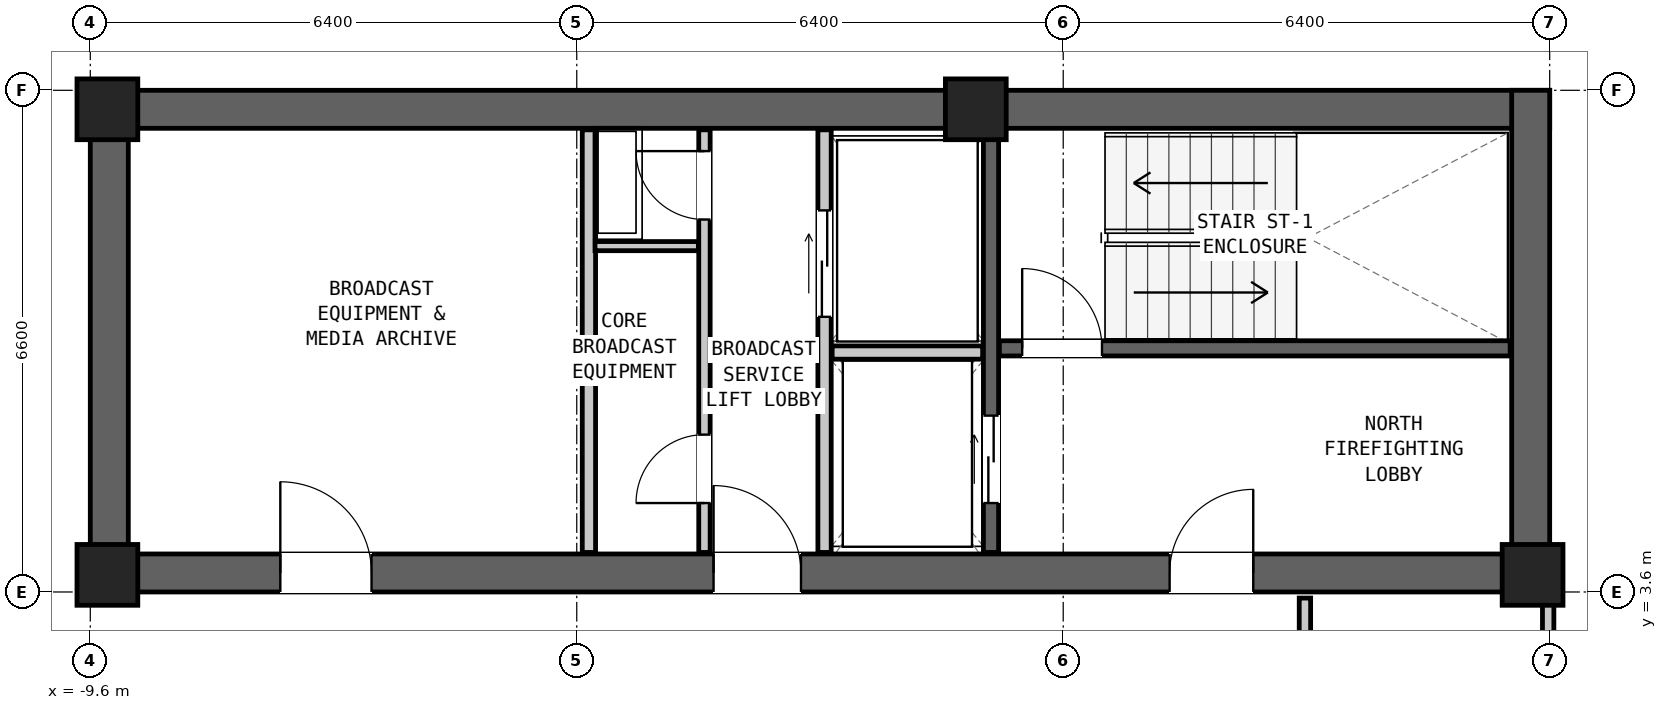
"""IFC4 building model, lengths in metres.
Left out: names, types, materials, properties, quantities, classifications, styles, units other than length and angle.
Written with IfcOpenShell. Run it as: python <this file> out.ifc"""

import sys

from ifc_helpers import new_model, si_unit, direction, frame, frame_2d, origin, origin_2d, place, context, subcontext, project, spatial, rectangle, extrude, element, fill, save


model = new_model("IFC4")
c1 = context("Model", 3, precision=1e-05, world=origin(), true_north=direction((0.0, 1.0)))
c2 = subcontext(c1, "Body", "Model", "MODEL_VIEW")
j1 = project(units=[si_unit("LENGTHUNIT", "METRE"), si_unit("PLANEANGLEUNIT", "RADIAN")], contexts=[c1])
p1 = place(None, origin())
s1 = spatial("IfcSite", under=j1, at=p1, CompositionType="ELEMENT")
p2 = place(p1, origin())
s2 = spatial("IfcBuilding", under=s1, at=p2, CompositionType="ELEMENT")
p3 = place(p2, frame((0.0, 0.0, 148.2)))
s3 = spatial("IfcBuildingStorey", under=s2, at=p3, CompositionType="ELEMENT", Elevation=148.2)
p4 = place(p3, frame((-9.6, 9.95, 0.0), z_axis=(0.0, 0.0, 1.0), x_axis=(1.0, 0.0, 0.0)))
e1 = element("IfcWall", 1, at=p4, inside=s3, PredefinedType="SHEAR", context=c2, shape_type="SweptSolid", body=[
    extrude(rectangle(XDim=19.2, YDim=0.5, at=frame_2d((9.6, 0.0))), origin(), (0.0, 0.0, 1.0), 3.6),
])
p5 = place(p3, frame((-9.6, 3.85, 0.0), z_axis=(0.0, 0.0, 1.0), x_axis=(1.0, 0.0, 0.0)))
e2 = element("IfcWall", 2, at=p5, inside=s3, PredefinedType="SHEAR", context=c2, shape_type="SweptSolid", body=[
    extrude(rectangle(XDim=19.2, YDim=0.5, at=frame_2d((9.6, 0.0))), origin(), (0.0, 0.0, 1.0), 3.6),
])
p6 = place(p5, frame((14.2, 0.0, 0.0)))
e3 = element("IfcOpeningElement", 3, at=p6, cuts=e2, PredefinedType="OPENING", context=c2, shape_type="SweptSolid", body=[
    extrude(rectangle(XDim=1.1, YDim=2.08, at=frame_2d((0.55, 1.04))), frame((0.0, 0.262, 0.0), z_axis=(0.0, -1.0, 0.0), x_axis=(1.0, 0.0, 0.0)), (0.0, 0.0, 1.0), 0.524),
])
p7 = place(p5, frame((8.2, 0.0, 0.0)))
e4 = element("IfcOpeningElement", 4, at=p7, cuts=e2, PredefinedType="OPENING", context=c2, shape_type="SweptSolid", body=[
    extrude(rectangle(XDim=1.15, YDim=2.1, at=frame_2d((0.575, 1.05))), frame((0.0, 0.262, 0.0), z_axis=(0.0, -1.0, 0.0), x_axis=(1.0, 0.0, 0.0)), (0.0, 0.0, 1.0), 0.524),
])
p8 = place(p5, frame((2.5, 0.0, 0.0)))
e5 = element("IfcOpeningElement", 5, at=p8, cuts=e2, PredefinedType="OPENING", context=c2, shape_type="SweptSolid", body=[
    extrude(rectangle(XDim=1.2, YDim=2.1, at=frame_2d((0.6, 1.05))), frame((0.0, 0.262, 0.0), z_axis=(0.0, -1.0, 0.0), x_axis=(1.0, 0.0, 0.0)), (0.0, 0.0, 1.0), 0.524),
])
for number, where, z_axis, x_axis in (
    (6, (-9.35, 3.6, 0.0), (0.0, 0.0, 1.0), (0.0, 1.0, 0.0)),
    (7, (9.35, 3.6, 0.0), (0.0, 0.0, 1.0), (0.0, 1.0, 0.0)),
):
    element("IfcWall", number, at=place(p3, frame(where, z_axis=z_axis, x_axis=x_axis)), inside=s3, PredefinedType="SHEAR", context=c2, shape_type="SweptSolid", body=[
        extrude(rectangle(XDim=6.6, YDim=0.5, at=frame_2d((3.3, 0.0))), origin(), (0.0, 0.0, 1.0), 3.6),
    ])
for number, where, z_axis, x_axis in (
    (8, (-9.375, 9.95, 0.0), (0.0, 0.0, 1.0), (1.0, 0.0, 0.0)),
    (9, (2.05, 9.95, 0.0), (0.0, 0.0, 1.0), (1.0, 0.0, 0.0)),
    (10, (-9.375, 3.825, 0.0), (0.0, 0.0, 1.0), (1.0, 0.0, 0.0)),
    (11, (9.375, 3.825, 0.0), (0.0, 0.0, 1.0), (1.0, 0.0, 0.0)),
):
    element("IfcColumn", number, at=place(p3, frame(where, z_axis=z_axis, x_axis=x_axis)), inside=s3, PredefinedType="COLUMN", context=c2, shape_type="SweptSolid", body=[
        extrude(rectangle(XDim=0.8, YDim=0.8, at=origin_2d()), origin(), (0.0, 0.0, 1.0), 3.6),
    ])
p9 = place(p3, frame((2.36, 6.805, 0.0), z_axis=(0.0, 0.0, 1.0), x_axis=(1.0, 0.0, 0.0)))
e12 = element("IfcWall", 12, at=p9, inside=s3, PredefinedType="SHEAR", context=c2, shape_type="SweptSolid", body=[
    extrude(rectangle(XDim=6.72, YDim=0.2, at=frame_2d((3.36, 0.0))), origin(), (0.0, 0.0, 1.0), 3.22),
])
p10 = place(p9, frame((0.3, 0.0, 0.0)))
e13 = element("IfcOpeningElement", 13, at=p10, cuts=e12, PredefinedType="OPENING", context=c2, shape_type="SweptSolid", body=[
    extrude(rectangle(XDim=1.05, YDim=2.08, at=frame_2d((0.525, 1.04))), frame((0.0, 0.112, 0.0), z_axis=(0.0, -1.0, 0.0), x_axis=(1.0, 0.0, 0.0)), (0.0, 0.0, 1.0), 0.224),
])
p11 = place(p3, frame((2.25, 4.12, 0.0), z_axis=(0.0, 0.0, 1.0), x_axis=(0.0, 1.0, 0.0)))
e14 = element("IfcWall", 14, at=p11, inside=s3, PredefinedType="SHEAR", context=c2, shape_type="SweptSolid", body=[
    extrude(rectangle(XDim=5.56, YDim=0.2, at=frame_2d((2.78, 0.0))), origin(), (0.0, 0.0, 1.0), 3.22),
])
p12 = place(p11, frame((0.65, 0.0, 0.0)))
e15 = element("IfcOpeningElement", 15, at=p12, cuts=e14, PredefinedType="OPENING", context=c2, shape_type="SweptSolid", body=[
    extrude(rectangle(XDim=1.15, YDim=2.08, at=frame_2d((0.575, 1.04))), frame((0.0, 0.112, 0.0), z_axis=(0.0, -1.0, 0.0), x_axis=(1.0, 0.0, 0.0)), (0.0, 0.0, 1.0), 0.224),
])
p13 = place(p3, frame((0.06, 4.12, 0.0), z_axis=(0.0, 0.0, 1.0), x_axis=(0.0, 1.0, 0.0)))
e16 = element("IfcWall", 16, at=p13, inside=s3, PredefinedType="PARTITIONING", context=c2, shape_type="SweptSolid", body=[
    extrude(rectangle(XDim=5.56, YDim=0.175, at=frame_2d((2.78, 0.0))), origin(), (0.0, 0.0, 1.0), 3.22),
])
p14 = place(p13, frame((3.1, 0.0, 0.0)))
e17 = element("IfcOpeningElement", 17, at=p14, cuts=e16, PredefinedType="OPENING", context=c2, shape_type="SweptSolid", body=[
    extrude(rectangle(XDim=1.4, YDim=2.12, at=frame_2d((0.7, 1.06))), frame((0.0, 0.1, 0.0), z_axis=(0.0, -1.0, 0.0), x_axis=(1.0, 0.0, 0.0)), (0.0, 0.0, 1.0), 0.199),
])
p15 = place(p3, frame((0.16, 6.75, 0.0), z_axis=(0.0, 0.0, 1.0), x_axis=(1.0, 0.0, 0.0)))
e18 = element("IfcWall", 18, at=p15, inside=s3, PredefinedType="PARTITIONING", context=c2, shape_type="SweptSolid", body=[
    extrude(rectangle(XDim=1.98, YDim=0.175, at=frame_2d((0.99, 0.0))), origin(), (0.0, 0.0, 1.0), 3.22),
])
p16 = place(p3, frame((-3.04, 4.12, 0.0), z_axis=(0.0, 0.0, 1.0), x_axis=(0.0, 1.0, 0.0)))
e19 = element("IfcWall", 19, at=p16, inside=s3, PredefinedType="PARTITIONING", context=c2, shape_type="SweptSolid", body=[
    extrude(rectangle(XDim=5.56, YDim=0.175, at=frame_2d((2.78, 0.0))), origin(), (0.0, 0.0, 1.0), 3.22),
])
p17 = place(p3, frame((-1.52, 4.12, 0.0), z_axis=(0.0, 0.0, 1.0), x_axis=(0.0, 1.0, 0.0)))
e20 = element("IfcWall", 20, at=p17, inside=s3, PredefinedType="PARTITIONING", context=c2, shape_type="SweptSolid", body=[
    extrude(rectangle(XDim=5.56, YDim=0.15, at=frame_2d((2.78, 0.0))), origin(), (0.0, 0.0, 1.0), 3.22),
])
p18 = place(p17, frame((4.38, 0.0, 0.0)))
e21 = element("IfcOpeningElement", 21, at=p18, cuts=e20, PredefinedType="OPENING", context=c2, shape_type="SweptSolid", body=[
    extrude(rectangle(XDim=0.9, YDim=2.05, at=frame_2d((0.45, 1.025))), frame((0.0, 0.087, 0.0), z_axis=(0.0, -1.0, 0.0), x_axis=(1.0, 0.0, 0.0)), (0.0, 0.0, 1.0), 0.174),
])
p19 = place(p17, frame((0.65, 0.0, 0.0)))
e22 = element("IfcOpeningElement", 22, at=p19, cuts=e20, PredefinedType="OPENING", context=c2, shape_type="SweptSolid", body=[
    extrude(rectangle(XDim=0.9, YDim=2.05, at=frame_2d((0.45, 1.025))), frame((0.0, 0.087, 0.0), z_axis=(0.0, -1.0, 0.0), x_axis=(1.0, 0.0, 0.0)), (0.0, 0.0, 1.0), 0.174),
])
p20 = place(p3, frame((-2.96, 8.15, 0.0), z_axis=(0.0, 0.0, 1.0), x_axis=(1.0, 0.0, 0.0)))
e23 = element("IfcWall", 23, at=p20, inside=s3, PredefinedType="PARTITIONING", context=c2, shape_type="SweptSolid", body=[
    extrude(rectangle(XDim=1.36, YDim=0.12, at=frame_2d((0.68, 0.0))), origin(), (0.0, 0.0, 1.0), 3.22),
])
p21 = place(p3, frame((6.38, -2.32, 0.0), z_axis=(0.0, 0.0, 1.0), x_axis=(0.0, 1.0, 0.0)))
e24 = element("IfcWall", 24, at=p21, inside=s3, PredefinedType="PARTITIONING", context=c2, shape_type="SweptSolid", body=[
    extrude(rectangle(XDim=5.84, YDim=0.15, at=frame_2d((2.92, 0.0))), origin(), (0.0, 0.0, 1.0), 2.588),
])
p22 = place(p3, frame((9.58, -2.32, 0.0), z_axis=(0.0, 0.0, 1.0), x_axis=(0.0, 1.0, 0.0)))
e25 = element("IfcWall", 25, at=p22, inside=s3, PredefinedType="PARTITIONING", context=c2, shape_type="SweptSolid", body=[
    extrude(rectangle(XDim=5.84, YDim=0.15, at=frame_2d((2.92, 0.0))), origin(), (0.0, 0.0, 1.0), 2.588),
])
p23 = place(p22, frame((2.445, 0.0, 0.0)))
e26 = element("IfcOpeningElement", 26, at=p23, cuts=e25, PredefinedType="OPENING", context=c2, shape_type="SweptSolid", body=[
    extrude(rectangle(XDim=0.95, YDim=2.1, at=frame_2d((0.475, 1.05))), frame((0.0, 0.087, 0.0), z_axis=(0.0, -1.0, 0.0), x_axis=(1.0, 0.0, 0.0)), (0.0, 0.0, 1.0), 0.174),
])
p24 = place(p10, origin())
e27 = element("IfcDoor", 27, at=p24, inside=s3, OperationType="SINGLE_SWING_LEFT", PredefinedType="DOOR", context=c2, shape_type="SweptSolid", body=[
    extrude(rectangle(XDim=1.05, YDim=2.08, at=frame_2d((0.525, 1.04))), frame((0.0, 0.025, 0.0), z_axis=(0.0, -1.0, 0.0), x_axis=(1.0, 0.0, 0.0)), (0.0, 0.0, 1.0), 0.05),
])
fill(e13, e27)
p25 = place(p6, origin())
e28 = element("IfcDoor", 28, at=p25, inside=s3, OperationType="SINGLE_SWING_RIGHT", PredefinedType="DOOR", context=c2, shape_type="SweptSolid", body=[
    extrude(rectangle(XDim=1.1, YDim=2.08, at=frame_2d((0.55, 1.04))), frame((0.0, 0.025, 0.0), z_axis=(0.0, -1.0, 0.0), x_axis=(1.0, 0.0, 0.0)), (0.0, 0.0, 1.0), 0.05),
])
fill(e3, e28)
p26 = place(p12, origin())
e29 = element("IfcDoor", 29, at=p26, inside=s3, OperationType="DOUBLE_DOOR_SLIDING", PredefinedType="DOOR", context=c2, shape_type="SweptSolid", body=[
    extrude(rectangle(XDim=1.15, YDim=2.08, at=frame_2d((0.575, 1.04))), frame((0.0, 0.025, 0.0), z_axis=(0.0, -1.0, 0.0), x_axis=(1.0, 0.0, 0.0)), (0.0, 0.0, 1.0), 0.05),
])
fill(e15, e29)
p27 = place(p14, origin())
e30 = element("IfcDoor", 30, at=p27, inside=s3, OperationType="DOUBLE_DOOR_SLIDING", PredefinedType="DOOR", context=c2, shape_type="SweptSolid", body=[
    extrude(rectangle(XDim=1.4, YDim=2.12, at=frame_2d((0.7, 1.06))), frame((0.0, 0.025, 0.0), z_axis=(0.0, -1.0, 0.0), x_axis=(1.0, 0.0, 0.0)), (0.0, 0.0, 1.0), 0.05),
])
fill(e17, e30)
p28 = place(p7, origin())
e31 = element("IfcDoor", 31, at=p28, inside=s3, OperationType="SINGLE_SWING_LEFT", PredefinedType="DOOR", context=c2, shape_type="SweptSolid", body=[
    extrude(rectangle(XDim=1.15, YDim=2.1, at=frame_2d((0.575, 1.05))), frame((0.0, 0.025, 0.0), z_axis=(0.0, -1.0, 0.0), x_axis=(1.0, 0.0, 0.0)), (0.0, 0.0, 1.0), 0.05),
])
fill(e4, e31)
p29 = place(p18, origin())
e32 = element("IfcDoor", 32, at=p29, inside=s3, OperationType="SINGLE_SWING_RIGHT", PredefinedType="DOOR", context=c2, shape_type="SweptSolid", body=[
    extrude(rectangle(XDim=0.9, YDim=2.05, at=frame_2d((0.45, 1.025))), frame((0.0, 0.025, 0.0), z_axis=(0.0, -1.0, 0.0), x_axis=(1.0, 0.0, 0.0)), (0.0, 0.0, 1.0), 0.05),
])
fill(e21, e32)
p30 = place(p19, origin())
e33 = element("IfcDoor", 33, at=p30, inside=s3, OperationType="SINGLE_SWING_LEFT", PredefinedType="DOOR", context=c2, shape_type="SweptSolid", body=[
    extrude(rectangle(XDim=0.9, YDim=2.05, at=frame_2d((0.45, 1.025))), frame((0.0, 0.025, 0.0), z_axis=(0.0, -1.0, 0.0), x_axis=(1.0, 0.0, 0.0)), (0.0, 0.0, 1.0), 0.05),
])
fill(e22, e33)
p31 = place(p8, origin())
e34 = element("IfcDoor", 34, at=p31, inside=s3, OperationType="SINGLE_SWING_LEFT", PredefinedType="DOOR", context=c2, shape_type="SweptSolid", body=[
    extrude(rectangle(XDim=1.2, YDim=2.1, at=frame_2d((0.6, 1.05))), frame((0.0, 0.025, 0.0), z_axis=(0.0, -1.0, 0.0), x_axis=(1.0, 0.0, 0.0)), (0.0, 0.0, 1.0), 0.05),
])
fill(e5, e34)
save(model, sys.argv[1])
